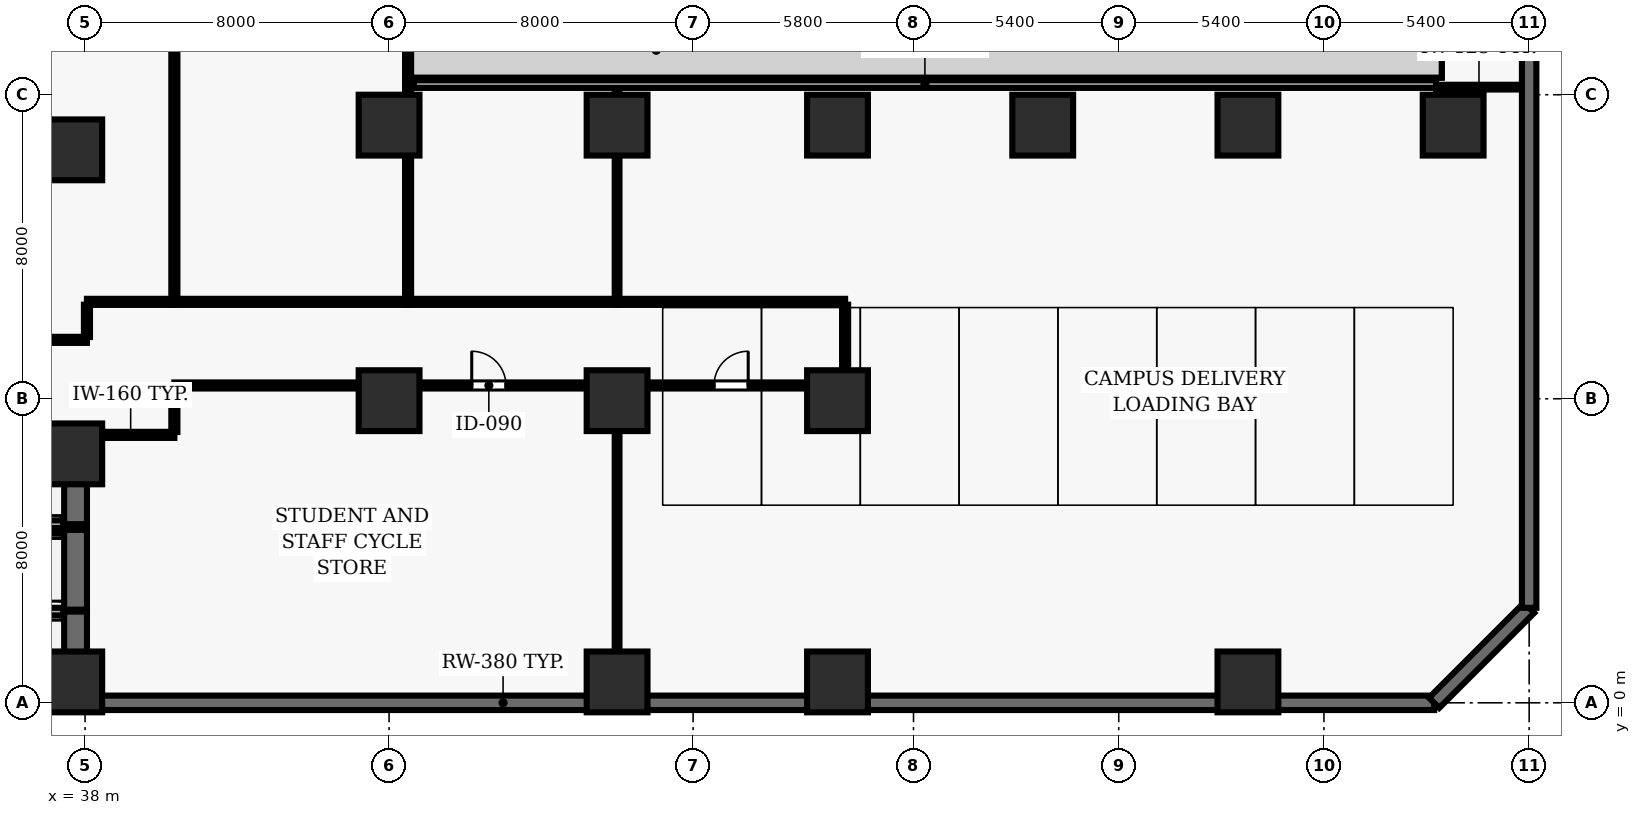
"""IFC4 building model, lengths in metres.
Left out: names, types, materials, properties, quantities, classifications, styles, units other than length and angle.
Written with IfcOpenShell. Run it as: python <this file> out.ifc"""

import sys

from ifc_helpers import new_model, si_unit, direction, frame, frame_2d, origin, origin_2d, place, context, subcontext, project, spatial, rectangle, extrude, element, fill, save


model = new_model("IFC4")
c1 = context("Model", 3, precision=1e-05, world=origin(), true_north=direction((0.0, 1.0)))
c2 = subcontext(c1, "Body", "Model", "MODEL_VIEW")
j1 = project(units=[si_unit("LENGTHUNIT", "METRE"), si_unit("PLANEANGLEUNIT", "RADIAN")], contexts=[c1])
p1 = place(None, origin())
s1 = spatial("IfcSite", under=j1, at=p1, CompositionType="ELEMENT")
p2 = place(p1, origin())
s2 = spatial("IfcBuilding", under=s1, at=p2, CompositionType="ELEMENT")
p3 = place(p2, frame((0.0, 0.0, -4.5)))
s3 = spatial("IfcBuildingStorey", under=s2, at=p3, CompositionType="ELEMENT", Elevation=-4.5)
for number, where, z_axis, x_axis in (
    (1, (37.65, 0.55, 0.0), (0.0, 0.0, 1.0), (1.0, 0.0, 0.0)),
    (2, (37.65, 6.55, 0.0), (0.0, 0.0, 1.0), (1.0, 0.0, 0.0)),
    (3, (37.65, 14.55, 0.0), (0.0, 0.0, 1.0), (1.0, 0.0, 0.0)),
    (4, (46.0, 7.95, 0.0), (0.0, 0.0, 1.0), (1.0, 0.0, 0.0)),
    (5, (46.0, 15.2, 0.0), (0.0, 0.0, 1.0), (1.0, 0.0, 0.0)),
    (6, (52.0, 0.55, 0.0), (0.0, 0.0, 1.0), (1.0, 0.0, 0.0)),
    (7, (52.0, 7.95, 0.0), (0.0, 0.0, 1.0), (1.0, 0.0, 0.0)),
    (8, (52.0, 15.2, 0.0), (0.0, 0.0, 1.0), (1.0, 0.0, 0.0)),
    (9, (57.8, 0.55, 0.0), (0.0, 0.0, 1.0), (1.0, 0.0, 0.0)),
    (10, (57.8, 7.95, 0.0), (0.0, 0.0, 1.0), (1.0, 0.0, 0.0)),
    (11, (57.8, 15.2, 0.0), (0.0, 0.0, 1.0), (1.0, 0.0, 0.0)),
    (12, (63.2, 15.2, 0.0), (0.0, 0.0, 1.0), (1.0, 0.0, 0.0)),
    (13, (68.6, 0.55, 0.0), (0.0, 0.0, 1.0), (1.0, 0.0, 0.0)),
    (14, (68.6, 15.2, 0.0), (0.0, 0.0, 1.0), (1.0, 0.0, 0.0)),
    (15, (74.0, 15.2, 0.0), (0.0, 0.0, 1.0), (1.0, 0.0, 0.0)),
):
    element("IfcColumn", number, at=place(p3, frame(where, z_axis=z_axis, x_axis=x_axis)), inside=s3, PredefinedType="COLUMN", context=c2, shape_type="SweptSolid", body=[
        extrude(rectangle(XDim=1.6, YDim=1.6, at=origin_2d()), origin(), (0.0, 0.0, 1.0), 4.5),
    ])
p4 = place(p3, frame((24.5, 0.0, 0.0), z_axis=(0.0, 0.0, 1.0), x_axis=(1.0, 0.0, 0.0)))
e16 = element("IfcWall", 16, at=p4, inside=s3, PredefinedType="USERDEFINED", context=c2, shape_type="SweptSolid", body=[
    extrude(rectangle(XDim=49.0, YDim=0.38, at=frame_2d((24.5, 0.0))), origin(), (0.0, 0.0, 1.0), 4.22),
])
p5 = place(p3, frame((73.5, 0.0, 0.0), z_axis=(0.0, 0.0, 1.0), x_axis=(0.707106781187, 0.707106781187, 0.0)))
e17 = element("IfcWall", 17, at=p5, inside=s3, PredefinedType="USERDEFINED", context=c2, shape_type="SweptSolid", body=[
    extrude(rectangle(XDim=3.536, YDim=0.38, at=frame_2d((1.768, 0.0))), origin(), (0.0, 0.0, 1.0), 4.22),
])
p6 = place(p3, frame((76.0, 2.5, 0.0), z_axis=(0.0, 0.0, 1.0), x_axis=(0.0, 1.0, 0.0)))
e18 = element("IfcWall", 18, at=p6, inside=s3, PredefinedType="USERDEFINED", context=c2, shape_type="SweptSolid", body=[
    extrude(rectangle(XDim=27.0, YDim=0.38, at=frame_2d((13.5, 0.0))), origin(), (0.0, 0.0, 1.0), 4.22),
])
p7 = place(p3, frame((37.75, 0.3, 0.0), z_axis=(0.0, 0.0, 1.0), x_axis=(0.0, 1.0, 0.0)))
e19 = element("IfcWall", 19, at=p7, inside=s3, PredefinedType="SHEAR", context=c2, shape_type="SweptSolid", body=[
    extrude(rectangle(XDim=2.1, YDim=0.6, at=frame_2d((1.05, 0.0))), origin(), (0.0, 0.0, 1.0), 4.22),
])
for number, where, z_axis, x_axis in (
    (20, (35.28, 0.3, 0.0), (0.0, 0.0, 1.0), (1.0, 0.0, 0.0)),
    (21, (37.42, 2.4, 0.0), (0.0, 0.0, 1.0), (-1.0, 0.0, 0.0)),
):
    element("IfcWall", number, at=place(p3, frame(where, z_axis=z_axis, x_axis=x_axis)), inside=s3, PredefinedType="SOLIDWALL", context=c2, shape_type="SweptSolid", body=[
        extrude(rectangle(XDim=2.14, YDim=0.2, at=frame_2d((1.07, 0.0))), origin(), (0.0, 0.0, 1.0), 4.22),
    ])
p8 = place(p3, frame((37.75, 2.45, 0.0), z_axis=(0.0, 0.0, 1.0), x_axis=(0.0, 1.0, 0.0)))
e22 = element("IfcWall", 22, at=p8, inside=s3, PredefinedType="SHEAR", context=c2, shape_type="SweptSolid", body=[
    extrude(rectangle(XDim=2.1, YDim=0.6, at=frame_2d((1.05, 0.0))), origin(), (0.0, 0.0, 1.0), 4.22),
])
p9 = place(p3, frame((37.42, 4.55, 0.0), z_axis=(0.0, 0.0, 1.0), x_axis=(-1.0, 0.0, 0.0)))
e23 = element("IfcWall", 23, at=p9, inside=s3, PredefinedType="SOLIDWALL", context=c2, shape_type="SweptSolid", body=[
    extrude(rectangle(XDim=2.14, YDim=0.2, at=frame_2d((1.07, 0.0))), origin(), (0.0, 0.0, 1.0), 4.22),
])
p10 = place(p3, frame((37.75, 4.7, 0.0), z_axis=(0.0, 0.0, 1.0), x_axis=(0.0, 1.0, 0.0)))
e24 = element("IfcWall", 24, at=p10, inside=s3, PredefinedType="SHEAR", context=c2, shape_type="SweptSolid", body=[
    extrude(rectangle(XDim=2.25, YDim=0.6, at=frame_2d((1.125, 0.0))), origin(), (0.0, 0.0, 1.0), 4.22),
])
for number, where, z_axis, x_axis in (
    (25, (35.28, 4.7, 0.0), (0.0, 0.0, 1.0), (1.0, 0.0, 0.0)),
    (26, (37.42, 6.95, 0.0), (0.0, 0.0, 1.0), (-1.0, 0.0, 0.0)),
):
    element("IfcWall", number, at=place(p3, frame(where, z_axis=z_axis, x_axis=x_axis)), inside=s3, PredefinedType="SOLIDWALL", context=c2, shape_type="SweptSolid", body=[
        extrude(rectangle(XDim=2.14, YDim=0.2, at=frame_2d((1.07, 0.0))), origin(), (0.0, 0.0, 1.0), 4.22),
    ])
p11 = place(p3, frame((46.65, 16.28, 0.0), z_axis=(0.0, 0.0, 1.0), x_axis=(1.0, 0.0, 0.0)))
e27 = element("IfcWall", 27, at=p11, inside=s3, PredefinedType="SOLIDWALL", context=c2, shape_type="SweptSolid", body=[
    extrude(rectangle(XDim=26.9, YDim=0.2, at=frame_2d((13.45, 0.0))), origin(), (0.0, 0.0, 1.0), 4.22),
])
p12 = place(p3, frame((38.05, 7.05, 0.0), z_axis=(0.0, 0.0, 1.0), x_axis=(1.0, 0.0, 0.0)))
e28 = element("IfcWall", 28, at=p12, inside=s3, PredefinedType="PARTITIONING", context=c2, shape_type="SweptSolid", body=[
    extrude(rectangle(XDim=2.3, YDim=0.16, at=frame_2d((1.15, 0.0))), origin(), (0.0, 0.0, 1.0), 4.22),
])
p13 = place(p3, frame((38.05, 9.55, 0.0), z_axis=(0.0, 0.0, 1.0), x_axis=(-1.0, 0.0, 0.0)))
e29 = element("IfcWall", 29, at=p13, inside=s3, PredefinedType="PARTITIONING", context=c2, shape_type="SweptSolid", body=[
    extrude(rectangle(XDim=2.9, YDim=0.16, at=frame_2d((1.45, 0.0))), origin(), (0.0, 0.0, 1.0), 4.22),
])
p14 = place(p3, frame((40.35, 8.35, 0.0), z_axis=(0.0, 0.0, 1.0), x_axis=(1.0, 0.0, 0.0)))
e30 = element("IfcWall", 30, at=p14, inside=s3, PredefinedType="PARTITIONING", context=c2, shape_type="SweptSolid", body=[
    extrude(rectangle(XDim=11.65, YDim=0.16, at=frame_2d((5.825, 0.0))), origin(), (0.0, 0.0, 1.0), 3.365),
])
p15 = place(p14, frame((7.825, 0.0, 0.0)))
e31 = element("IfcOpeningElement", 31, at=p15, cuts=e30, PredefinedType="OPENING", context=c2, shape_type="SweptSolid", body=[
    extrude(rectangle(XDim=0.9, YDim=2.1, at=frame_2d((0.45, 1.05))), frame((0.0, 0.09, 0.0), z_axis=(0.0, -1.0, 0.0), x_axis=(1.0, 0.0, 0.0)), (0.0, 0.0, 1.0), 0.18),
])
p16 = place(p3, frame((40.35, 10.55, 0.0), z_axis=(0.0, 0.0, 1.0), x_axis=(-1.0, 0.0, 0.0)))
e32 = element("IfcWall", 32, at=p16, inside=s3, PredefinedType="PARTITIONING", context=c2, shape_type="SweptSolid", body=[
    extrude(rectangle(XDim=2.3, YDim=0.16, at=frame_2d((1.15, 0.0))), origin(), (0.0, 0.0, 1.0), 3.751),
])
p17 = place(p3, frame((46.5, 10.55, 0.0), z_axis=(0.0, 0.0, 1.0), x_axis=(-1.0, 0.0, 0.0)))
e33 = element("IfcWall", 33, at=p17, inside=s3, PredefinedType="PARTITIONING", context=c2, shape_type="SweptSolid", body=[
    extrude(rectangle(XDim=6.15, YDim=0.16, at=frame_2d((3.075, 0.0))), origin(), (0.0, 0.0, 1.0), 3.751),
])
p18 = place(p3, frame((52.0, 8.35, 0.0), z_axis=(0.0, 0.0, 1.0), x_axis=(1.0, 0.0, 0.0)))
e34 = element("IfcWall", 34, at=p18, inside=s3, PredefinedType="PARTITIONING", context=c2, shape_type="SweptSolid", body=[
    extrude(rectangle(XDim=6.0, YDim=0.16, at=frame_2d((3.0, 0.0))), origin(), (0.0, 0.0, 1.0), 3.365),
])
p19 = place(p18, frame((2.55, 0.0, 0.0)))
e35 = element("IfcOpeningElement", 35, at=p19, cuts=e34, PredefinedType="OPENING", context=c2, shape_type="SweptSolid", body=[
    extrude(rectangle(XDim=0.9, YDim=2.1, at=frame_2d((0.45, 1.05))), frame((0.0, 0.09, 0.0), z_axis=(0.0, -1.0, 0.0), x_axis=(1.0, 0.0, 0.0)), (0.0, 0.0, 1.0), 0.18),
])
p20 = place(p3, frame((52.0, 10.55, 0.0), z_axis=(0.0, 0.0, 1.0), x_axis=(-1.0, 0.0, 0.0)))
e36 = element("IfcWall", 36, at=p20, inside=s3, PredefinedType="PARTITIONING", context=c2, shape_type="SweptSolid", body=[
    extrude(rectangle(XDim=5.5, YDim=0.16, at=frame_2d((2.75, 0.0))), origin(), (0.0, 0.0, 1.0), 3.751),
])
p21 = place(p3, frame((58.0, 10.55, 0.0), z_axis=(0.0, 0.0, 1.0), x_axis=(-1.0, 0.0, 0.0)))
e37 = element("IfcWall", 37, at=p21, inside=s3, PredefinedType="PARTITIONING", context=c2, shape_type="SweptSolid", body=[
    extrude(rectangle(XDim=6.0, YDim=0.16, at=frame_2d((3.0, 0.0))), origin(), (0.0, 0.0, 1.0), 3.751),
])
p22 = place(p3, frame((75.81, 16.2, 0.0), z_axis=(0.0, 0.0, 1.0), x_axis=(-1.0, 0.0, 0.0)))
e38 = element("IfcWall", 38, at=p22, inside=s3, PredefinedType="PARTITIONING", context=c2, shape_type="SweptSolid", body=[
    extrude(rectangle(XDim=2.26, YDim=0.125, at=frame_2d((1.13, 0.0))), origin(), (0.0, 0.0, 1.0), 4.22),
])
p23 = place(p3, frame((38.05, 10.475, 0.0), z_axis=(0.0, 0.0, 1.0), x_axis=(0.0, -1.0, 0.0)))
e39 = element("IfcWall", 39, at=p23, inside=s3, PredefinedType="PARTITIONING", context=c2, shape_type="SweptSolid", body=[
    extrude(rectangle(XDim=0.85, YDim=0.16, at=frame_2d((0.425, 0.0))), origin(), (0.0, 0.0, 1.0), 3.365),
])
p24 = place(p3, frame((40.35, 7.125, 0.0), z_axis=(0.0, 0.0, 1.0), x_axis=(0.0, 1.0, 0.0)))
e40 = element("IfcWall", 40, at=p24, inside=s3, PredefinedType="PARTITIONING", context=c2, shape_type="SweptSolid", body=[
    extrude(rectangle(XDim=1.15, YDim=0.16, at=frame_2d((0.575, 0.0))), origin(), (0.0, 0.0, 1.0), 4.22),
])
p25 = place(p3, frame((40.35, 23.775, 0.0), z_axis=(0.0, 0.0, 1.0), x_axis=(0.0, -1.0, 0.0)))
e41 = element("IfcWall", 41, at=p25, inside=s3, PredefinedType="PARTITIONING", context=c2, shape_type="SweptSolid", body=[
    extrude(rectangle(XDim=13.15, YDim=0.16, at=frame_2d((6.575, 0.0))), origin(), (0.0, 0.0, 1.0), 3.751),
])
p26 = place(p3, frame((46.5, 10.625, 0.0), z_axis=(0.0, 0.0, 1.0), x_axis=(0.0, 1.0, 0.0)))
e42 = element("IfcWall", 42, at=p26, inside=s3, PredefinedType="PARTITIONING", context=c2, shape_type="SweptSolid", body=[
    extrude(rectangle(XDim=10.375, YDim=0.16, at=frame_2d((5.188, 0.0))), origin(), (0.0, 0.0, 1.0), 3.365),
])
p27 = place(p3, frame((52.0, 0.19, 0.0), z_axis=(0.0, 0.0, 1.0), x_axis=(0.0, 1.0, 0.0)))
e43 = element("IfcWall", 43, at=p27, inside=s3, PredefinedType="PARTITIONING", context=c2, shape_type="SweptSolid", body=[
    extrude(rectangle(XDim=8.085, YDim=0.125, at=frame_2d((4.042, 0.0))), origin(), (0.0, 0.0, 1.0), 3.365),
])
p28 = place(p3, frame((52.0, 16.15, 0.0), z_axis=(0.0, 0.0, 1.0), x_axis=(0.0, -1.0, 0.0)))
e44 = element("IfcWall", 44, at=p28, inside=s3, PredefinedType="PARTITIONING", context=c2, shape_type="SweptSolid", body=[
    extrude(rectangle(XDim=5.525, YDim=0.125, at=frame_2d((2.762, 0.0))), origin(), (0.0, 0.0, 1.0), 3.365),
])
p29 = place(p3, frame((58.0, 8.425, 0.0), z_axis=(0.0, 0.0, 1.0), x_axis=(0.0, 1.0, 0.0)))
e45 = element("IfcWall", 45, at=p29, inside=s3, PredefinedType="PARTITIONING", context=c2, shape_type="SweptSolid", body=[
    extrude(rectangle(XDim=2.05, YDim=0.16, at=frame_2d((1.025, 0.0))), origin(), (0.0, 0.0, 1.0), 3.365),
])
p30 = place(p15, origin())
e46 = element("IfcDoor", 46, at=p30, inside=s3, OperationType="SINGLE_SWING_LEFT", PredefinedType="DOOR", context=c2, shape_type="SweptSolid", body=[
    extrude(rectangle(XDim=0.9, YDim=2.1, at=frame_2d((0.45, 1.05))), frame((0.0, 0.025, 0.0), z_axis=(0.0, -1.0, 0.0), x_axis=(1.0, 0.0, 0.0)), (0.0, 0.0, 1.0), 0.05),
])
fill(e31, e46)
p31 = place(p19, origin())
e47 = element("IfcDoor", 47, at=p31, inside=s3, OperationType="SINGLE_SWING_RIGHT", PredefinedType="DOOR", context=c2, shape_type="SweptSolid", body=[
    extrude(rectangle(XDim=0.9, YDim=2.1, at=frame_2d((0.45, 1.05))), frame((0.0, 0.025, 0.0), z_axis=(0.0, -1.0, 0.0), x_axis=(1.0, 0.0, 0.0)), (0.0, 0.0, 1.0), 0.05),
])
fill(e35, e47)
save(model, sys.argv[1])
